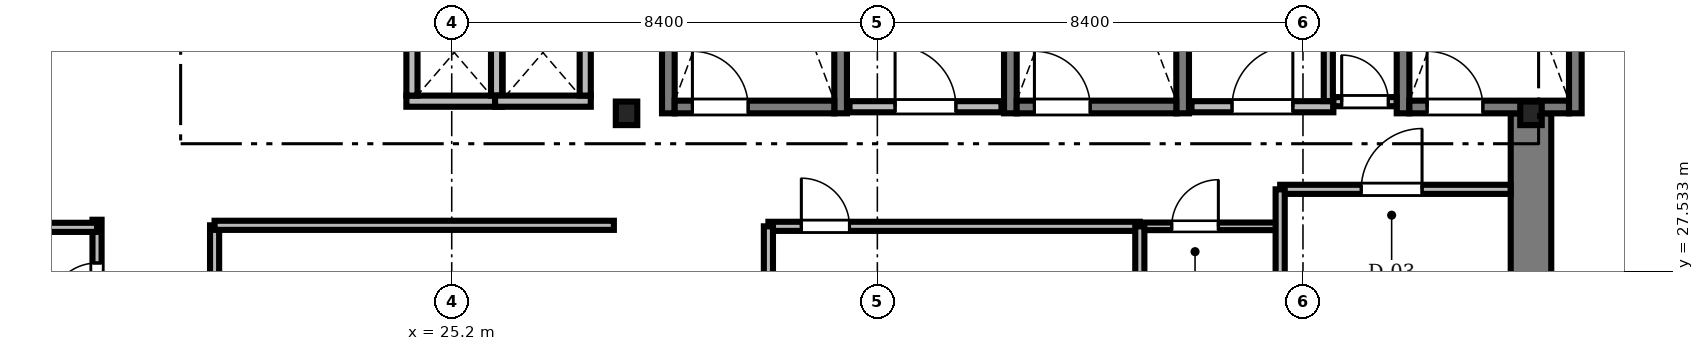
"""IFC4 building model, lengths in metres.
Left out: names, types, materials, properties, quantities, classifications, styles, units other than length and angle.
Written with IfcOpenShell. Run it as: python <this file> out.ifc"""

import sys

from ifc_helpers import new_model, si_unit, direction, frame, frame_2d, origin, origin_2d, place, context, subcontext, project, spatial, rectangle, i_section, extrude, source, transform, mapped, element, fill, save


model = new_model("IFC4")
c1 = context("Model", 3, precision=1e-05, world=origin(), true_north=direction((0.0, 1.0)))
c2 = subcontext(c1, "Body", "Model", "MODEL_VIEW")
j1 = project(units=[si_unit("LENGTHUNIT", "METRE"), si_unit("PLANEANGLEUNIT", "RADIAN")], contexts=[c1])
p1 = place(None, origin())
s1 = spatial("IfcSite", under=j1, at=p1, CompositionType="ELEMENT")
p2 = place(p1, origin())
s2 = spatial("IfcBuilding", under=s1, at=p2, CompositionType="ELEMENT")
p3 = place(p2, frame((0.0, 0.0, 129.8)))
s3 = spatial("IfcBuildingStorey", under=s2, at=p3, CompositionType="ELEMENT", Elevation=129.8)
m1 = source(origin(), c2, "Body", "SweptSolid", [
    extrude(rectangle(XDim=13.15, YDim=0.8, at=frame_2d((6.575, 0.0))), origin(), (0.0, 0.0, 1.0), 3.46),
])
p4 = place(p3, frame((46.5, 17.5, 0.0), z_axis=(0.0, 0.0, 1.0), x_axis=(0.0, 1.0, 0.0)))
e1 = element("IfcWall", 1, at=p4, inside=s3, PredefinedType="SHEAR", context=c2, shape_type="MappedRepresentation", body=[
    mapped(m1, transform((0.0, 0.0, 0.0), scale=1.0)),
])
m2 = source(origin(), c2, "Body", "SweptSolid", [
    extrude(i_section(OverallWidth=0.424, OverallDepth=0.465, WebThickness=0.035, FlangeThickness=0.056, FilletRadius=0.015, at=origin_2d()), origin(), (0.0, 0.0, 1.0), 3.46),
])
for number, where, z_axis, x_axis in (
    (2, (28.65, 30.65, 0.0), (0.0, 0.0, 1.0), (1.0, 0.0, 0.0)),
    (3, (46.5, 30.65, 0.0), (0.0, 0.0, 1.0), (1.0, 0.0, 0.0)),
):
    element("IfcColumn", number, at=place(p3, frame(where, z_axis=z_axis, x_axis=x_axis)), inside=s3, PredefinedType="COLUMN", context=c2, shape_type="MappedRepresentation", body=[
        mapped(m2, transform((0.0, 0.0, 0.0), scale=1.0)),
    ])
m3 = source(origin(), c2, "Body", "SweptSolid", [
    extrude(rectangle(XDim=9.25, YDim=0.25, at=frame_2d((4.625, 0.0))), origin(), (0.0, 0.0, 1.0), 3.5),
])
for number, where, z_axis, x_axis in (
    (4, (29.475, 30.65, 0.0), (0.0, 0.0, 1.0), (0.0, 1.0, 0.0)),
    (5, (32.875, 30.65, 0.0), (0.0, 0.0, 1.0), (0.0, 1.0, 0.0)),
):
    element("IfcWall", number, at=place(p3, frame(where, z_axis=z_axis, x_axis=x_axis)), inside=s3, PredefinedType="SOLIDWALL", context=c2, shape_type="MappedRepresentation", body=[
        mapped(m3, transform((0.0, 0.0, 0.0), scale=1.0)),
    ])
m4 = source(origin(), c2, "Body", "SweptSolid", [
    extrude(rectangle(XDim=3.15, YDim=0.25, at=frame_2d((1.575, 0.0))), origin(), (0.0, 0.0, 1.0), 3.5),
])
p5 = place(p3, frame((29.6, 30.775, 0.0), z_axis=(0.0, 0.0, 1.0), x_axis=(1.0, 0.0, 0.0)))
e6 = element("IfcWall", 6, at=p5, inside=s3, PredefinedType="SOLIDWALL", context=c2, shape_type="MappedRepresentation", body=[
    mapped(m4, transform((0.0, 0.0, 0.0), scale=1.0)),
])
m5 = source(origin(), c2, "Body", "SweptSolid", [
    extrude(rectangle(XDim=1.1, YDim=2.2, at=frame_2d((0.55, 1.1))), frame((0.0, 0.135, 0.0), z_axis=(0.0, -1.0, 0.0), x_axis=(1.0, 0.0, 0.0)), (0.0, 0.0, 1.0), 0.27),
])
p6 = place(p5, frame((0.35, 0.0, 0.0)))
e7 = element("IfcOpeningElement", 7, at=p6, cuts=e6, PredefinedType="OPENING", context=c2, shape_type="MappedRepresentation", body=[
    mapped(m5, transform((0.0, 0.0, 0.0), scale=1.0)),
])
for number, where, z_axis, x_axis in (
    (8, (36.225, 30.65, 0.0), (0.0, 0.0, 1.0), (0.0, 1.0, 0.0)),
    (9, (39.625, 30.65, 0.0), (0.0, 0.0, 1.0), (0.0, 1.0, 0.0)),
):
    element("IfcWall", number, at=place(p3, frame(where, z_axis=z_axis, x_axis=x_axis)), inside=s3, PredefinedType="SOLIDWALL", context=c2, shape_type="MappedRepresentation", body=[
        mapped(m3, transform((0.0, 0.0, 0.0), scale=1.0)),
    ])
p7 = place(p3, frame((36.35, 30.775, 0.0), z_axis=(0.0, 0.0, 1.0), x_axis=(1.0, 0.0, 0.0)))
e10 = element("IfcWall", 10, at=p7, inside=s3, PredefinedType="SOLIDWALL", context=c2, shape_type="MappedRepresentation", body=[
    mapped(m4, transform((0.0, 0.0, 0.0), scale=1.0)),
])
p8 = place(p7, frame((0.35, 0.0, 0.0)))
e11 = element("IfcOpeningElement", 11, at=p8, cuts=e10, PredefinedType="OPENING", context=c2, shape_type="MappedRepresentation", body=[
    mapped(m5, transform((0.0, 0.0, 0.0), scale=1.0)),
])
for number, where, z_axis, x_axis in (
    (12, (43.975, 30.65, 0.0), (0.0, 0.0, 1.0), (0.0, 1.0, 0.0)),
    (13, (47.375, 30.65, 0.0), (0.0, 0.0, 1.0), (0.0, 1.0, 0.0)),
):
    element("IfcWall", number, at=place(p3, frame(where, z_axis=z_axis, x_axis=x_axis)), inside=s3, PredefinedType="SOLIDWALL", context=c2, shape_type="MappedRepresentation", body=[
        mapped(m3, transform((0.0, 0.0, 0.0), scale=1.0)),
    ])
p9 = place(p3, frame((44.1, 30.775, 0.0), z_axis=(0.0, 0.0, 1.0), x_axis=(1.0, 0.0, 0.0)))
e14 = element("IfcWall", 14, at=p9, inside=s3, PredefinedType="SOLIDWALL", context=c2, shape_type="MappedRepresentation", body=[
    mapped(m4, transform((0.0, 0.0, 0.0), scale=1.0)),
])
p10 = place(p9, frame((0.35, 0.0, 0.0)))
e15 = element("IfcOpeningElement", 15, at=p10, cuts=e14, PredefinedType="OPENING", context=c2, shape_type="MappedRepresentation", body=[
    mapped(m5, transform((0.0, 0.0, 0.0), scale=1.0)),
])
m6 = source(origin(), c2, "Body", "SweptSolid", [
    extrude(rectangle(XDim=3.0, YDim=0.22, at=frame_2d((1.5, 0.0))), origin(), (0.0, 0.0, 1.0), 3.46),
])
p11 = place(p3, frame((33.05, 30.78, 0.0), z_axis=(0.0, 0.0, 1.0), x_axis=(1.0, 0.0, 0.0)))
e16 = element("IfcWall", 16, at=p11, inside=s3, PredefinedType="SOLIDWALL", context=c2, shape_type="MappedRepresentation", body=[
    mapped(m6, transform((0.0, 0.0, 0.0), scale=1.0)),
])
m7 = source(origin(), c2, "Body", "SweptSolid", [
    extrude(rectangle(XDim=1.2, YDim=2.2, at=frame_2d((0.6, 1.1))), frame((0.0, 0.12, 0.0), z_axis=(0.0, -1.0, 0.0), x_axis=(1.0, 0.0, 0.0)), (0.0, 0.0, 1.0), 0.24),
])
p12 = place(p11, frame((0.9, 0.0, 0.0)))
e17 = element("IfcOpeningElement", 17, at=p12, cuts=e16, PredefinedType="OPENING", context=c2, shape_type="MappedRepresentation", body=[
    mapped(m7, transform((0.0, 0.0, 0.0), scale=1.0)),
])
m8 = source(origin(), c2, "Body", "SweptSolid", [
    extrude(rectangle(XDim=2.8, YDim=0.22, at=frame_2d((1.4, 0.0))), origin(), (0.0, 0.0, 1.0), 3.46),
])
p13 = place(p3, frame((39.8, 30.78, 0.0), z_axis=(0.0, 0.0, 1.0), x_axis=(1.0, 0.0, 0.0)))
e18 = element("IfcWall", 18, at=p13, inside=s3, PredefinedType="SOLIDWALL", context=c2, shape_type="MappedRepresentation", body=[
    mapped(m8, transform((0.0, 0.0, 0.0), scale=1.0)),
])
p14 = place(p13, frame((0.8, 0.0, 0.0)))
e19 = element("IfcOpeningElement", 19, at=p14, cuts=e18, PredefinedType="OPENING", context=c2, shape_type="MappedRepresentation", body=[
    mapped(m7, transform((0.0, 0.0, 0.0), scale=1.0)),
])
m9 = source(origin(), c2, "Body", "SweptSolid", [
    extrude(rectangle(XDim=1.89, YDim=0.22, at=frame_2d((0.945, 0.0))), origin(), (0.0, 0.0, 1.0), 3.46),
])
p15 = place(p3, frame((24.305, 30.89, 0.0), z_axis=(0.0, 0.0, 1.0), x_axis=(1.0, 0.0, 0.0)))
e20 = element("IfcWall", 20, at=p15, inside=s3, PredefinedType="SOLIDWALL", context=c2, shape_type="MappedRepresentation", body=[
    mapped(m9, transform((0.0, 0.0, 0.0), scale=1.0)),
])
m10 = source(origin(), c2, "Body", "SweptSolid", [
    extrude(rectangle(XDim=1.7, YDim=0.22, at=frame_2d((0.85, 0.0))), origin(), (0.0, 0.0, 1.0), 3.46),
])
for number, where, z_axis, x_axis in (
    (21, (24.415, 31.0, 0.0), (0.0, 0.0, 1.0), (0.0, 1.0, 0.0)),
    (22, (26.085, 31.0, 0.0), (0.0, 0.0, 1.0), (0.0, 1.0, 0.0)),
):
    element("IfcWall", number, at=place(p3, frame(where, z_axis=z_axis, x_axis=x_axis)), inside=s3, PredefinedType="SOLIDWALL", context=c2, shape_type="MappedRepresentation", body=[
        mapped(m10, transform((0.0, 0.0, 0.0), scale=1.0)),
    ])
p16 = place(p3, frame((26.055, 30.89, 0.0), z_axis=(0.0, 0.0, 1.0), x_axis=(1.0, 0.0, 0.0)))
e23 = element("IfcWall", 23, at=p16, inside=s3, PredefinedType="SOLIDWALL", context=c2, shape_type="MappedRepresentation", body=[
    mapped(m9, transform((0.0, 0.0, 0.0), scale=1.0)),
])
p17 = place(p3, frame((27.835, 31.0, 0.0), z_axis=(0.0, 0.0, 1.0), x_axis=(0.0, 1.0, 0.0)))
e24 = element("IfcWall", 24, at=p17, inside=s3, PredefinedType="SOLIDWALL", context=c2, shape_type="MappedRepresentation", body=[
    mapped(m10, transform((0.0, 0.0, 0.0), scale=1.0)),
])
m11 = source(origin(), c2, "Body", "SweptSolid", [
    extrude(rectangle(XDim=14.3, YDim=0.18, at=frame_2d((7.15, 0.0))), origin(), (0.0, 0.0, 1.0), 2.852),
])
p18 = place(p3, frame((18.2, 14.25, 0.0), z_axis=(0.0, 0.0, 1.0), x_axis=(0.0, 1.0, 0.0)))
e25 = element("IfcWall", 25, at=p18, inside=s3, PredefinedType="PARTITIONING", context=c2, shape_type="MappedRepresentation", body=[
    mapped(m11, transform((0.0, 0.0, 0.0), scale=1.0)),
])
m12 = source(origin(), c2, "Body", "SweptSolid", [
    extrude(rectangle(XDim=1.05, YDim=2.2, at=frame_2d((0.525, 1.1))), frame((0.0, 0.1, 0.0), z_axis=(0.0, -1.0, 0.0), x_axis=(1.0, 0.0, 0.0)), (0.0, 0.0, 1.0), 0.2),
])
p19 = place(p18, frame((1.838, 0.0, 0.0)))
e26 = element("IfcOpeningElement", 26, at=p19, cuts=e25, PredefinedType="OPENING", context=c2, shape_type="MappedRepresentation", body=[
    mapped(m12, transform((0.0, 0.0, 0.0), scale=1.0)),
])
m13 = source(origin(), c2, "Body", "SweptSolid", [
    extrude(rectangle(XDim=0.95, YDim=2.15, at=frame_2d((0.475, 1.075))), frame((0.0, 0.1, 0.0), z_axis=(0.0, -1.0, 0.0), x_axis=(1.0, 0.0, 0.0)), (0.0, 0.0, 1.0), 0.2),
])
p20 = place(p18, frame((7.78, 0.0, 0.0)))
e27 = element("IfcOpeningElement", 27, at=p20, cuts=e25, PredefinedType="OPENING", context=c2, shape_type="MappedRepresentation", body=[
    mapped(m13, transform((0.0, 0.0, 0.0), scale=1.0)),
])
p21 = place(p18, frame((12.497, 0.0, 0.0)))
e28 = element("IfcOpeningElement", 28, at=p21, cuts=e25, PredefinedType="OPENING", context=c2, shape_type="MappedRepresentation", body=[
    mapped(m13, transform((0.0, 0.0, 0.0), scale=1.0)),
])
m14 = source(origin(), c2, "Body", "SweptSolid", [
    extrude(rectangle(XDim=11.94, YDim=0.18, at=frame_2d((5.97, 0.0))), origin(), (0.0, 0.0, 1.0), 2.852),
])
p22 = place(p3, frame((20.52, 16.5, 0.0), z_axis=(0.0, 0.0, 1.0), x_axis=(0.0, 1.0, 0.0)))
e29 = element("IfcWall", 29, at=p22, inside=s3, PredefinedType="PARTITIONING", context=c2, shape_type="MappedRepresentation", body=[
    mapped(m14, transform((0.0, 0.0, 0.0), scale=1.0)),
])
p23 = place(p22, frame((4.5, 0.0, 0.0)))
e30 = element("IfcOpeningElement", 30, at=p23, cuts=e29, PredefinedType="OPENING", context=c2, shape_type="MappedRepresentation", body=[
    mapped(m12, transform((0.0, 0.0, 0.0), scale=1.0)),
])
m15 = source(origin(), c2, "Body", "SweptSolid", [
    extrude(rectangle(XDim=7.33, YDim=0.18, at=frame_2d((3.665, 0.0))), origin(), (0.0, 0.0, 1.0), 3.092),
])
p24 = place(p3, frame((31.45, 28.42, 0.0), z_axis=(0.0, 0.0, 1.0), x_axis=(1.0, 0.0, 0.0)))
e31 = element("IfcWall", 31, at=p24, inside=s3, PredefinedType="PARTITIONING", context=c2, shape_type="MappedRepresentation", body=[
    mapped(m15, transform((0.0, 0.0, 0.0), scale=1.0)),
])
p25 = place(p24, frame((0.65, 0.0, 0.0)))
e32 = element("IfcOpeningElement", 32, at=p25, cuts=e31, PredefinedType="OPENING", context=c2, shape_type="MappedRepresentation", body=[
    mapped(m13, transform((0.0, 0.0, 0.0), scale=1.0)),
])
m16 = source(origin(), c2, "Body", "SweptSolid", [
    extrude(rectangle(XDim=4.548, YDim=0.18, at=frame_2d((2.274, 0.0))), origin(), (0.0, 0.0, 1.0), 3.092),
])
p26 = place(p3, frame((41.55, 29.15, 0.0), z_axis=(0.0, 0.0, 1.0), x_axis=(1.0, 0.0, 0.0)))
e33 = element("IfcWall", 33, at=p26, inside=s3, PredefinedType="PARTITIONING", context=c2, shape_type="MappedRepresentation", body=[
    mapped(m16, transform((0.0, 0.0, 0.0), scale=1.0)),
])
m17 = source(origin(), c2, "Body", "SweptSolid", [
    extrude(rectangle(XDim=1.2, YDim=2.2, at=frame_2d((0.6, 1.1))), frame((0.0, 0.1, 0.0), z_axis=(0.0, -1.0, 0.0), x_axis=(1.0, 0.0, 0.0)), (0.0, 0.0, 1.0), 0.2),
])
p27 = place(p26, frame((1.6, 0.0, 0.0)))
e34 = element("IfcOpeningElement", 34, at=p27, cuts=e33, PredefinedType="OPENING", context=c2, shape_type="MappedRepresentation", body=[
    mapped(m17, transform((0.0, 0.0, 0.0), scale=1.0)),
])
m18 = source(origin(), c2, "Body", "SweptSolid", [
    extrude(rectangle(XDim=2.74, YDim=0.15, at=frame_2d((1.37, 0.0))), origin(), (0.0, 0.0, 1.0), 3.46),
])
p28 = place(p3, frame((38.78, 28.42, 0.0), z_axis=(0.0, 0.0, 1.0), x_axis=(1.0, 0.0, 0.0)))
e35 = element("IfcWall", 35, at=p28, inside=s3, PredefinedType="PARTITIONING", context=c2, shape_type="MappedRepresentation", body=[
    mapped(m18, transform((0.0, 0.0, 0.0), scale=1.0)),
])
m19 = source(origin(), c2, "Body", "SweptSolid", [
    extrude(rectangle(XDim=0.92, YDim=2.1, at=frame_2d((0.46, 1.05))), frame((0.0, 0.085, 0.0), z_axis=(0.0, -1.0, 0.0), x_axis=(1.0, 0.0, 0.0)), (0.0, 0.0, 1.0), 0.17),
])
p29 = place(p28, frame((0.63, 0.0, 0.0)))
e36 = element("IfcOpeningElement", 36, at=p29, cuts=e35, PredefinedType="OPENING", context=c2, shape_type="MappedRepresentation", body=[
    mapped(m19, transform((0.0, 0.0, 0.0), scale=1.0)),
])
m20 = source(origin(), c2, "Body", "SweptSolid", [
    extrude(rectangle(XDim=1.248, YDim=0.18, at=frame_2d((0.624, 0.0))), origin(), (0.0, 0.0, 1.0), 3.46),
])
p30 = place(p3, frame((42.6, 30.88, 0.0), z_axis=(0.0, 0.0, 1.0), x_axis=(1.0, 0.0, 0.0)))
e37 = element("IfcWall", 37, at=p30, inside=s3, PredefinedType="PARTITIONING", context=c2, shape_type="MappedRepresentation", body=[
    mapped(m20, transform((0.0, 0.0, 0.0), scale=1.0)),
])
m21 = source(origin(), c2, "Body", "SweptSolid", [
    extrude(rectangle(XDim=0.92, YDim=2.1, at=frame_2d((0.46, 1.05))), frame((0.0, 0.1, 0.0), z_axis=(0.0, -1.0, 0.0), x_axis=(1.0, 0.0, 0.0)), (0.0, 0.0, 1.0), 0.2),
])
p31 = place(p30, frame((0.164, 0.0, 0.0)))
e38 = element("IfcOpeningElement", 38, at=p31, cuts=e37, PredefinedType="OPENING", context=c2, shape_type="MappedRepresentation", body=[
    mapped(m21, transform((0.0, 0.0, 0.0), scale=1.0)),
])
m22 = source(origin(), c2, "Body", "SweptSolid", [
    extrude(rectangle(XDim=11.47, YDim=0.18, at=frame_2d((5.735, 0.0))), origin(), (0.0, 0.0, 1.0), 2.702),
])
p32 = place(p3, frame((6.73, 28.4, 0.0), z_axis=(0.0, 0.0, 1.0), x_axis=(1.0, 0.0, 0.0)))
e39 = element("IfcWall", 39, at=p32, inside=s3, PredefinedType="PARTITIONING", context=c2, shape_type="MappedRepresentation", body=[
    mapped(m22, transform((0.0, 0.0, 0.0), scale=1.0)),
])
m23 = source(origin(), c2, "Body", "SweptSolid", [
    extrude(rectangle(XDim=7.88, YDim=0.18, at=frame_2d((3.94, 0.0))), origin(), (0.0, 0.0, 1.0), 3.46),
])
p33 = place(p3, frame((20.52, 28.44, 0.0), z_axis=(0.0, 0.0, 1.0), x_axis=(1.0, 0.0, 0.0)))
e40 = element("IfcWall", 40, at=p33, inside=s3, PredefinedType="PARTITIONING", context=c2, shape_type="MappedRepresentation", body=[
    mapped(m23, transform((0.0, 0.0, 0.0), scale=1.0)),
])
m24 = source(origin(), c2, "Body", "SweptSolid", [
    extrude(rectangle(XDim=2.758, YDim=0.18, at=frame_2d((1.379, 0.0))), origin(), (0.0, 0.0, 1.0), 3.46),
])
p34 = place(p3, frame((42.5, 30.892, 0.0), z_axis=(0.0, 0.0, 1.0), x_axis=(0.0, 1.0, 0.0)))
e41 = element("IfcWall", 41, at=p34, inside=s3, PredefinedType="PARTITIONING", context=c2, shape_type="MappedRepresentation", body=[
    mapped(m24, transform((0.0, 0.0, 0.0), scale=1.0)),
])
m25 = source(origin(), c2, "Body", "SweptSolid", [
    extrude(rectangle(XDim=2.35, YDim=0.18, at=frame_2d((1.175, 0.0))), origin(), (0.0, 0.0, 1.0), 2.852),
])
p35 = place(p3, frame((41.55, 26.8, 0.0), z_axis=(0.0, 0.0, 1.0), x_axis=(0.0, 1.0, 0.0)))
e42 = element("IfcWall", 42, at=p35, inside=s3, PredefinedType="PARTITIONING", context=c2, shape_type="MappedRepresentation", body=[
    mapped(m25, transform((0.0, 0.0, 0.0), scale=1.0)),
])
m26 = source(origin(), c2, "Body", "SweptSolid", [
    extrude(rectangle(XDim=1.6, YDim=0.18, at=frame_2d((0.8, 0.0))), origin(), (0.0, 0.0, 1.0), 3.002),
])
for number, where, z_axis, x_axis in (
    (43, (31.45, 26.82, 0.0), (0.0, 0.0, 1.0), (0.0, 1.0, 0.0)),
    (44, (38.78, 26.82, 0.0), (0.0, 0.0, 1.0), (0.0, 1.0, 0.0)),
):
    element("IfcWall", number, at=place(p3, frame(where, z_axis=z_axis, x_axis=x_axis)), inside=s3, PredefinedType="PARTITIONING", context=c2, shape_type="MappedRepresentation", body=[
        mapped(m26, transform((0.0, 0.0, 0.0), scale=1.0)),
    ])
m27 = source(origin(), c2, "Body", "SweptSolid", [
    extrude(rectangle(XDim=1.1, YDim=2.2, at=frame_2d((0.55, 1.1))), frame((0.0, 0.025, 0.0), z_axis=(0.0, -1.0, 0.0), x_axis=(1.0, 0.0, 0.0)), (0.0, 0.0, 1.0), 0.05),
])
p36 = place(p6, origin())
e45 = element("IfcDoor", 45, at=p36, inside=s3, OperationType="SINGLE_SWING_LEFT", PredefinedType="DOOR", context=c2, shape_type="MappedRepresentation", body=[
    mapped(m27, transform((0.0, 0.0, 0.0), scale=1.0)),
])
fill(e7, e45)
p37 = place(p8, origin())
e46 = element("IfcDoor", 46, at=p37, inside=s3, OperationType="SINGLE_SWING_LEFT", PredefinedType="DOOR", context=c2, shape_type="MappedRepresentation", body=[
    mapped(m27, transform((0.0, 0.0, 0.0), scale=1.0)),
])
fill(e11, e46)
p38 = place(p10, origin())
e47 = element("IfcDoor", 47, at=p38, inside=s3, OperationType="SINGLE_SWING_LEFT", PredefinedType="DOOR", context=c2, shape_type="MappedRepresentation", body=[
    mapped(m27, transform((0.0, 0.0, 0.0), scale=1.0)),
])
fill(e15, e47)
m28 = source(origin(), c2, "Body", "SweptSolid", [
    extrude(rectangle(XDim=1.2, YDim=2.2, at=frame_2d((0.6, 1.1))), frame((0.0, 0.025, 0.0), z_axis=(0.0, -1.0, 0.0), x_axis=(1.0, 0.0, 0.0)), (0.0, 0.0, 1.0), 0.05),
])
p39 = place(p12, origin())
e48 = element("IfcDoor", 48, at=p39, inside=s3, OperationType="SINGLE_SWING_LEFT", PredefinedType="DOOR", context=c2, shape_type="MappedRepresentation", body=[
    mapped(m28, transform((0.0, 0.0, 0.0), scale=1.0)),
])
fill(e17, e48)
p40 = place(p14, origin())
e49 = element("IfcDoor", 49, at=p40, inside=s3, OperationType="SINGLE_SWING_RIGHT", PredefinedType="DOOR", context=c2, shape_type="MappedRepresentation", body=[
    mapped(m28, transform((0.0, 0.0, 0.0), scale=1.0)),
])
fill(e19, e49)
m29 = source(origin(), c2, "Body", "SweptSolid", [
    extrude(rectangle(XDim=0.95, YDim=2.15, at=frame_2d((0.475, 1.075))), frame((0.0, 0.025, 0.0), z_axis=(0.0, -1.0, 0.0), x_axis=(1.0, 0.0, 0.0)), (0.0, 0.0, 1.0), 0.05),
])
p41 = place(p21, origin())
e50 = element("IfcDoor", 50, at=p41, inside=s3, OperationType="SINGLE_SWING_LEFT", PredefinedType="DOOR", context=c2, shape_type="MappedRepresentation", body=[
    mapped(m29, transform((0.0, 0.0, 0.0), scale=1.0)),
])
fill(e28, e50)
p42 = place(p25, origin())
e51 = element("IfcDoor", 51, at=p42, inside=s3, OperationType="SINGLE_SWING_LEFT", PredefinedType="DOOR", context=c2, shape_type="MappedRepresentation", body=[
    mapped(m29, transform((0.0, 0.0, 0.0), scale=1.0)),
])
fill(e32, e51)
p43 = place(p27, origin())
e52 = element("IfcDoor", 52, at=p43, inside=s3, OperationType="SINGLE_SWING_RIGHT", PredefinedType="DOOR", context=c2, shape_type="MappedRepresentation", body=[
    mapped(m28, transform((0.0, 0.0, 0.0), scale=1.0)),
])
fill(e34, e52)
m30 = source(origin(), c2, "Body", "SweptSolid", [
    extrude(rectangle(XDim=0.92, YDim=2.1, at=frame_2d((0.46, 1.05))), frame((0.0, 0.025, 0.0), z_axis=(0.0, -1.0, 0.0), x_axis=(1.0, 0.0, 0.0)), (0.0, 0.0, 1.0), 0.05),
])
p44 = place(p29, origin())
e53 = element("IfcDoor", 53, at=p44, inside=s3, OperationType="SINGLE_SWING_RIGHT", PredefinedType="DOOR", context=c2, shape_type="MappedRepresentation", body=[
    mapped(m30, transform((0.0, 0.0, 0.0), scale=1.0)),
])
fill(e36, e53)
p45 = place(p31, origin())
e54 = element("IfcDoor", 54, at=p45, inside=s3, OperationType="SINGLE_SWING_LEFT", PredefinedType="DOOR", context=c2, shape_type="MappedRepresentation", body=[
    mapped(m30, transform((0.0, 0.0, 0.0), scale=1.0)),
])
fill(e38, e54)
save(model, sys.argv[1])
